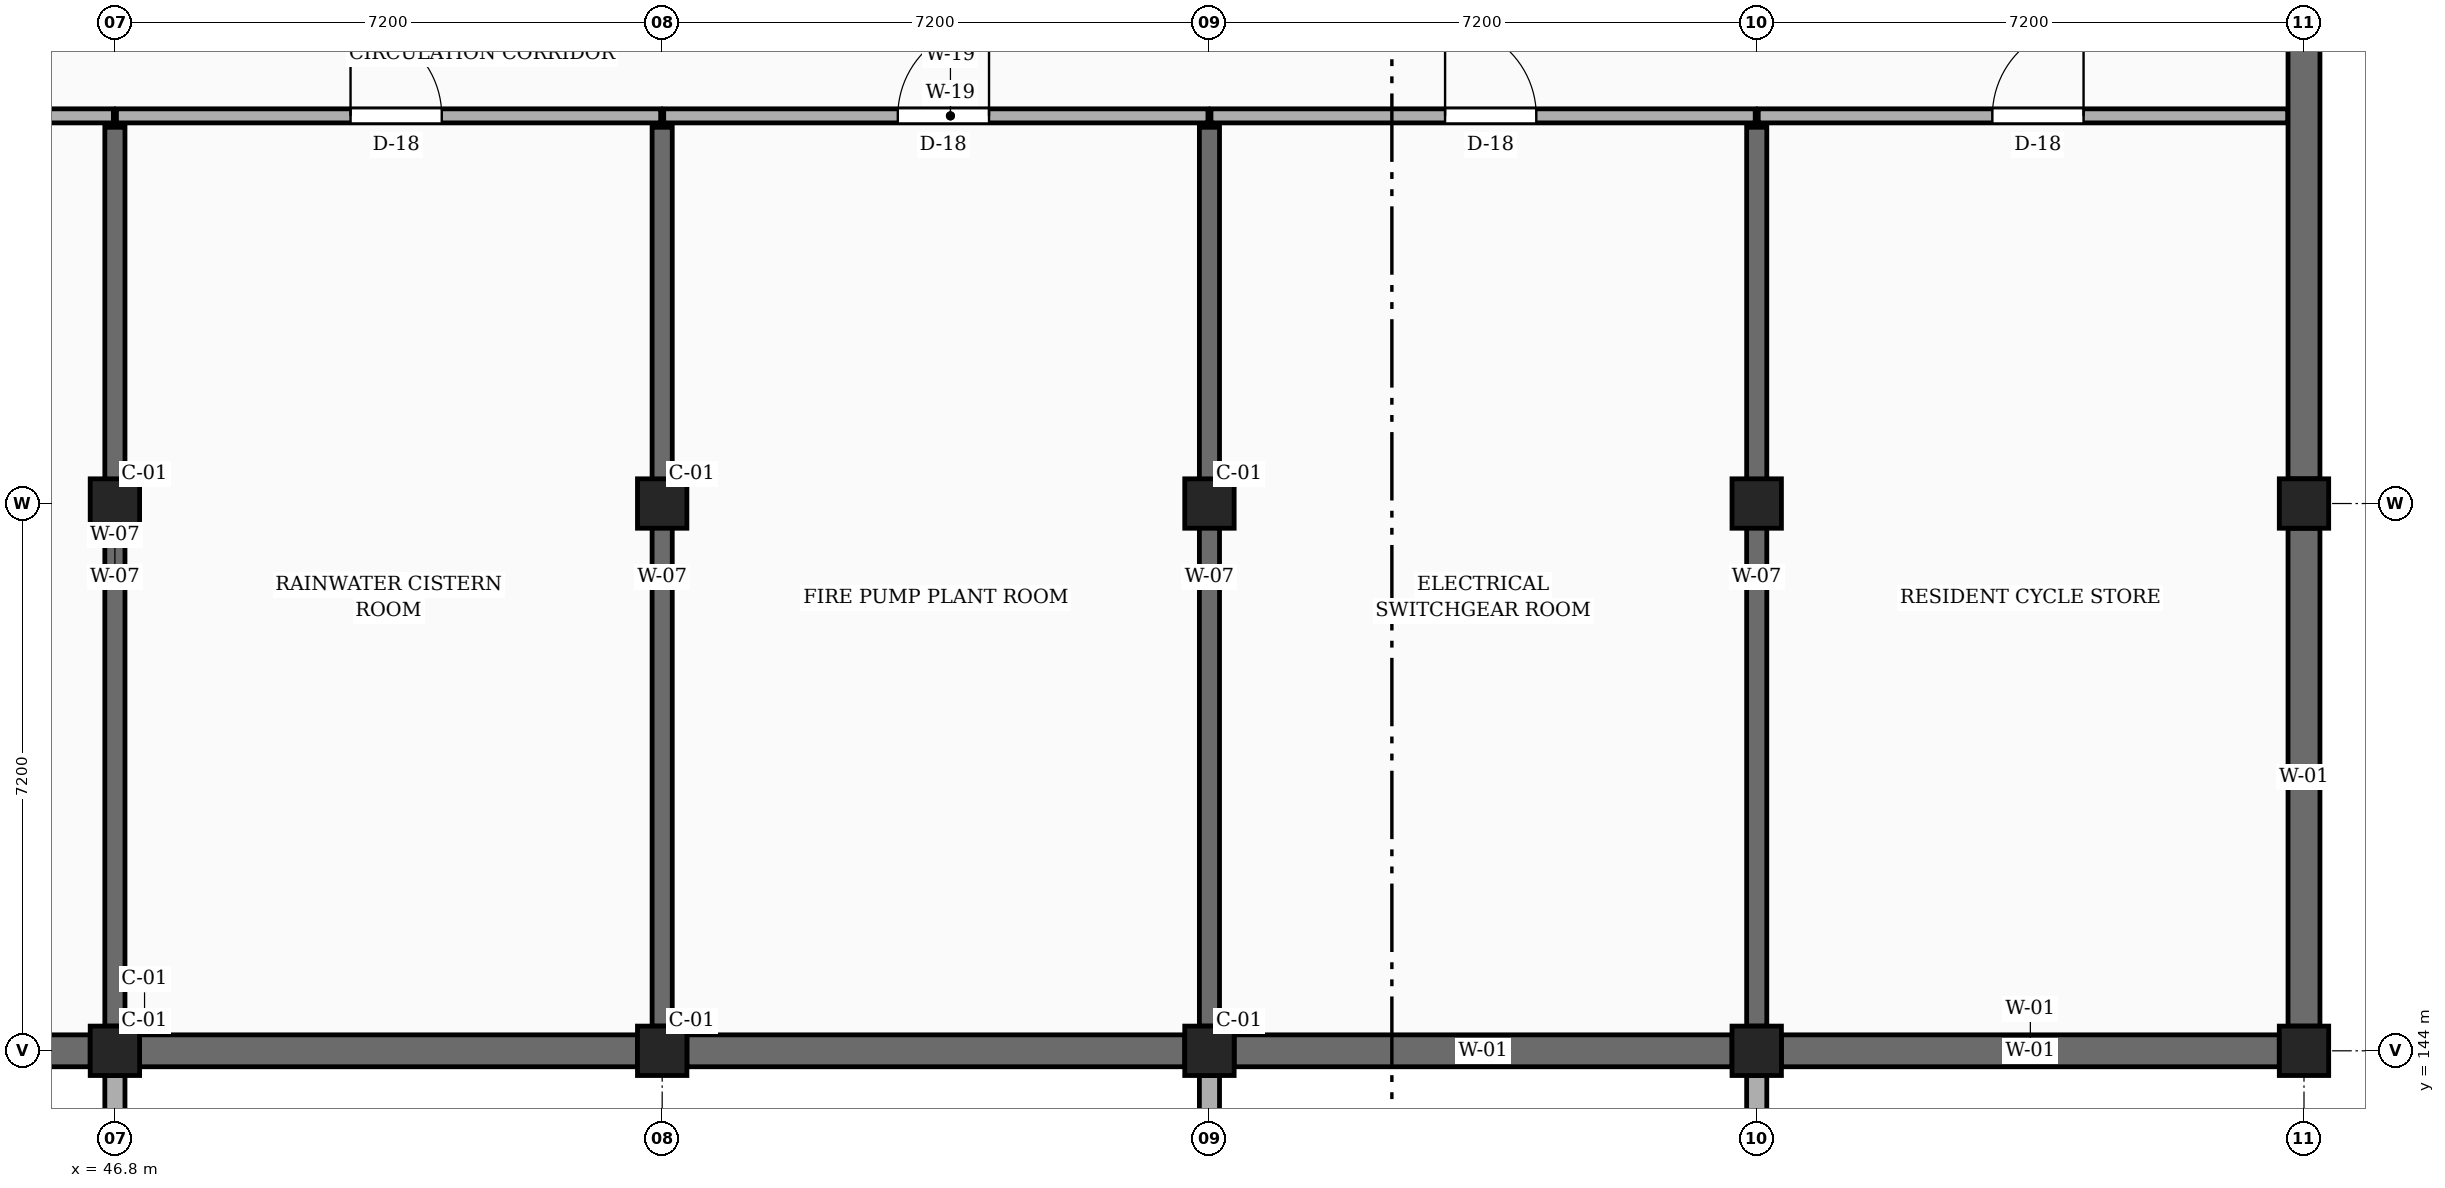
"""IFC4 building model, lengths in metres.
Left out: names, types, materials, properties, quantities, classifications, styles, units other than length and angle.
Written with IfcOpenShell. Run it as: python <this file> out.ifc"""

import sys

from ifc_helpers import new_model, si_unit, direction, frame, frame_2d, origin, origin_2d, place, context, subcontext, project, spatial, rectangle, extrude, element, fill, save


model = new_model("IFC4")
c1 = context("Model", 3, precision=1e-05, world=origin(), true_north=direction((0.0, 1.0)))
c2 = subcontext(c1, "Body", "Model", "MODEL_VIEW")
j1 = project(units=[si_unit("LENGTHUNIT", "METRE"), si_unit("PLANEANGLEUNIT", "RADIAN")], contexts=[c1])
p1 = place(None, origin())
s1 = spatial("IfcSite", under=j1, at=p1, CompositionType="ELEMENT")
p2 = place(p1, origin())
s2 = spatial("IfcBuilding", under=s1, at=p2, CompositionType="ELEMENT")
p3 = place(p2, frame((0.0, 0.0, -4.2)))
s3 = spatial("IfcBuildingStorey", under=s2, at=p3, CompositionType="ELEMENT", Elevation=-4.2)
for number, where, z_axis, x_axis in (
    (1, (46.8, 141.81, 0.0), (0.0, 0.0, 1.0), (0.0, 1.0, 0.0)),
    (2, (68.4, 141.81, 0.0), (0.0, 0.0, 1.0), (0.0, 1.0, 0.0)),
):
    element("IfcWall", number, at=place(p3, frame(where, z_axis=z_axis, x_axis=x_axis)), inside=s3, PredefinedType="SOLIDWALL", context=c2, shape_type="SweptSolid", body=[
        extrude(rectangle(XDim=1.865, YDim=0.265, at=frame_2d((0.933, 0.0))), origin(), (0.0, 0.0, 1.0), 4.12),
    ])
p4 = place(p3, frame((61.2, 143.675, 0.0), z_axis=(0.0, 0.0, 1.0), x_axis=(0.0, -1.0, 0.0)))
e3 = element("IfcWall", 3, at=p4, inside=s3, PredefinedType="SOLIDWALL", context=c2, shape_type="SweptSolid", body=[
    extrude(rectangle(XDim=1.865, YDim=0.265, at=frame_2d((0.933, 0.0))), origin(), (0.0, 0.0, 1.0), 3.35),
])
for number, where, z_axis, x_axis in (
    (4, (46.8, 144.0, 0.0), (0.0, 0.0, 1.0), (1.0, 0.0, 0.0)),
    (5, (46.8, 151.2, 0.0), (0.0, 0.0, 1.0), (1.0, 0.0, 0.0)),
    (6, (54.0, 144.0, 0.0), (0.0, 0.0, 1.0), (1.0, 0.0, 0.0)),
    (7, (54.0, 151.2, 0.0), (0.0, 0.0, 1.0), (1.0, 0.0, 0.0)),
    (8, (61.2, 144.0, 0.0), (0.0, 0.0, 1.0), (1.0, 0.0, 0.0)),
    (9, (61.2, 151.2, 0.0), (0.0, 0.0, 1.0), (1.0, 0.0, 0.0)),
    (10, (68.4, 144.0, 0.0), (0.0, 0.0, 1.0), (1.0, 0.0, 0.0)),
    (11, (68.4, 151.2, 0.0), (0.0, 0.0, 1.0), (1.0, 0.0, 0.0)),
    (12, (75.6, 144.0, 0.0), (0.0, 0.0, 1.0), (1.0, 0.0, 0.0)),
    (13, (75.6, 151.2, 0.0), (0.0, 0.0, 1.0), (1.0, 0.0, 0.0)),
):
    element("IfcColumn", number, at=place(p3, frame(where, z_axis=z_axis, x_axis=x_axis)), inside=s3, PredefinedType="COLUMN", context=c2, shape_type="SweptSolid", body=[
        extrude(rectangle(XDim=0.65, YDim=0.65, at=origin_2d()), origin(), (0.0, 0.0, 1.0), 4.2),
    ])
for number, where, z_axis, x_axis in (
    (14, (39.925, 144.0, 0.0), (0.0, 0.0, 1.0), (1.0, 0.0, 0.0)),
    (15, (47.125, 144.0, 0.0), (0.0, 0.0, 1.0), (1.0, 0.0, 0.0)),
    (16, (54.325, 144.0, 0.0), (0.0, 0.0, 1.0), (1.0, 0.0, 0.0)),
    (17, (61.525, 144.0, 0.0), (0.0, 0.0, 1.0), (1.0, 0.0, 0.0)),
):
    element("IfcWall", number, at=place(p3, frame(where, z_axis=z_axis, x_axis=x_axis)), inside=s3, PredefinedType="USERDEFINED", context=c2, shape_type="SweptSolid", body=[
        extrude(rectangle(XDim=6.55, YDim=0.42, at=frame_2d((3.275, 0.0))), origin(), (0.0, 0.0, 1.0), 3.03),
    ])
p5 = place(p3, frame((68.725, 144.0, 0.0), z_axis=(0.0, 0.0, 1.0), x_axis=(1.0, 0.0, 0.0)))
e18 = element("IfcWall", 18, at=p5, inside=s3, PredefinedType="USERDEFINED", context=c2, shape_type="SweptSolid", body=[
    extrude(rectangle(XDim=6.55, YDim=0.42, at=frame_2d((3.275, 0.0))), origin(), (0.0, 0.0, 1.0), 3.03),
])
for number, where, z_axis, x_axis in (
    (19, (75.6, 144.325, 0.0), (0.0, 0.0, 1.0), (0.0, 1.0, 0.0)),
    (20, (75.6, 151.525, 0.0), (0.0, 0.0, 1.0), (0.0, 1.0, 0.0)),
):
    element("IfcWall", number, at=place(p3, frame(where, z_axis=z_axis, x_axis=x_axis)), inside=s3, PredefinedType="USERDEFINED", context=c2, shape_type="SweptSolid", body=[
        extrude(rectangle(XDim=6.55, YDim=0.42, at=frame_2d((3.275, 0.0))), origin(), (0.0, 0.0, 1.0), 3.03),
    ])
for number, where, z_axis, x_axis in (
    (21, (46.8, 144.325, 0.0), (0.0, 0.0, 1.0), (0.0, 1.0, 0.0)),
    (22, (54.0, 144.325, 0.0), (0.0, 0.0, 1.0), (0.0, 1.0, 0.0)),
    (23, (61.2, 144.325, 0.0), (0.0, 0.0, 1.0), (0.0, 1.0, 0.0)),
    (24, (68.4, 144.325, 0.0), (0.0, 0.0, 1.0), (0.0, 1.0, 0.0)),
):
    element("IfcWall", number, at=place(p3, frame(where, z_axis=z_axis, x_axis=x_axis)), inside=s3, PredefinedType="SOLIDWALL", context=c2, shape_type="SweptSolid", body=[
        extrude(rectangle(XDim=11.825, YDim=0.265, at=frame_2d((5.913, 0.0))), origin(), (0.0, 0.0, 1.0), 3.18),
    ])
p6 = place(p3, frame((39.62, 156.3, 0.0), z_axis=(0.0, 0.0, 1.0), x_axis=(1.0, 0.0, 0.0)))
e25 = element("IfcWall", 25, at=p6, inside=s3, PredefinedType="PARTITIONING", context=c2, shape_type="SweptSolid", body=[
    extrude(rectangle(XDim=7.16, YDim=0.185, at=frame_2d((3.58, 0.0))), origin(), (0.0, 0.0, 1.0), 3.315),
])
p7 = place(p6, frame((3.08, 0.0, 0.0)))
e26 = element("IfcOpeningElement", 26, at=p7, cuts=e25, PredefinedType="OPENING", context=c2, shape_type="SweptSolid", body=[
    extrude(rectangle(XDim=1.2, YDim=2.2, at=frame_2d((0.6, 1.1))), frame((0.0, 0.103, 0.0), z_axis=(0.0, -1.0, 0.0), x_axis=(1.0, 0.0, 0.0)), (0.0, 0.0, 1.0), 0.205),
])
p8 = place(p3, frame((46.82, 156.3, 0.0), z_axis=(0.0, 0.0, 1.0), x_axis=(1.0, 0.0, 0.0)))
e27 = element("IfcWall", 27, at=p8, inside=s3, PredefinedType="PARTITIONING", context=c2, shape_type="SweptSolid", body=[
    extrude(rectangle(XDim=7.16, YDim=0.185, at=frame_2d((3.58, 0.0))), origin(), (0.0, 0.0, 1.0), 3.315),
])
p9 = place(p8, frame((3.08, 0.0, 0.0)))
e28 = element("IfcOpeningElement", 28, at=p9, cuts=e27, PredefinedType="OPENING", context=c2, shape_type="SweptSolid", body=[
    extrude(rectangle(XDim=1.2, YDim=2.2, at=frame_2d((0.6, 1.1))), frame((0.0, 0.103, 0.0), z_axis=(0.0, -1.0, 0.0), x_axis=(1.0, 0.0, 0.0)), (0.0, 0.0, 1.0), 0.205),
])
p10 = place(p3, frame((54.02, 156.3, 0.0), z_axis=(0.0, 0.0, 1.0), x_axis=(1.0, 0.0, 0.0)))
e29 = element("IfcWall", 29, at=p10, inside=s3, PredefinedType="PARTITIONING", context=c2, shape_type="SweptSolid", body=[
    extrude(rectangle(XDim=7.16, YDim=0.185, at=frame_2d((3.58, 0.0))), origin(), (0.0, 0.0, 1.0), 3.315),
])
p11 = place(p10, frame((3.08, 0.0, 0.0)))
e30 = element("IfcOpeningElement", 30, at=p11, cuts=e29, PredefinedType="OPENING", context=c2, shape_type="SweptSolid", body=[
    extrude(rectangle(XDim=1.2, YDim=2.2, at=frame_2d((0.6, 1.1))), frame((0.0, 0.103, 0.0), z_axis=(0.0, -1.0, 0.0), x_axis=(1.0, 0.0, 0.0)), (0.0, 0.0, 1.0), 0.205),
])
p12 = place(p3, frame((61.22, 156.3, 0.0), z_axis=(0.0, 0.0, 1.0), x_axis=(1.0, 0.0, 0.0)))
e31 = element("IfcWall", 31, at=p12, inside=s3, PredefinedType="PARTITIONING", context=c2, shape_type="SweptSolid", body=[
    extrude(rectangle(XDim=7.16, YDim=0.185, at=frame_2d((3.58, 0.0))), origin(), (0.0, 0.0, 1.0), 3.315),
])
p13 = place(p12, frame((3.08, 0.0, 0.0)))
e32 = element("IfcOpeningElement", 32, at=p13, cuts=e31, PredefinedType="OPENING", context=c2, shape_type="SweptSolid", body=[
    extrude(rectangle(XDim=1.2, YDim=2.2, at=frame_2d((0.6, 1.1))), frame((0.0, 0.103, 0.0), z_axis=(0.0, -1.0, 0.0), x_axis=(1.0, 0.0, 0.0)), (0.0, 0.0, 1.0), 0.205),
])
p14 = place(p3, frame((68.42, 156.3, 0.0), z_axis=(0.0, 0.0, 1.0), x_axis=(1.0, 0.0, 0.0)))
e33 = element("IfcWall", 33, at=p14, inside=s3, PredefinedType="PARTITIONING", context=c2, shape_type="SweptSolid", body=[
    extrude(rectangle(XDim=6.965, YDim=0.185, at=frame_2d((3.482, 0.0))), origin(), (0.0, 0.0, 1.0), 3.315),
])
p15 = place(p14, frame((3.08, 0.0, 0.0)))
e34 = element("IfcOpeningElement", 34, at=p15, cuts=e33, PredefinedType="OPENING", context=c2, shape_type="SweptSolid", body=[
    extrude(rectangle(XDim=1.2, YDim=2.2, at=frame_2d((0.6, 1.1))), frame((0.0, 0.103, 0.0), z_axis=(0.0, -1.0, 0.0), x_axis=(1.0, 0.0, 0.0)), (0.0, 0.0, 1.0), 0.205),
])
p16 = place(p9, origin())
e35 = element("IfcDoor", 35, at=p16, inside=s3, OperationType="SINGLE_SWING_LEFT", PredefinedType="DOOR", context=c2, shape_type="SweptSolid", body=[
    extrude(rectangle(XDim=1.2, YDim=2.2, at=frame_2d((0.6, 1.1))), frame((0.0, 0.025, 0.0), z_axis=(0.0, -1.0, 0.0), x_axis=(1.0, 0.0, 0.0)), (0.0, 0.0, 1.0), 0.05),
])
fill(e28, e35)
p17 = place(p11, origin())
e36 = element("IfcDoor", 36, at=p17, inside=s3, OperationType="SINGLE_SWING_RIGHT", PredefinedType="DOOR", context=c2, shape_type="SweptSolid", body=[
    extrude(rectangle(XDim=1.2, YDim=2.2, at=frame_2d((0.6, 1.1))), frame((0.0, 0.025, 0.0), z_axis=(0.0, -1.0, 0.0), x_axis=(1.0, 0.0, 0.0)), (0.0, 0.0, 1.0), 0.05),
])
fill(e30, e36)
p18 = place(p13, origin())
e37 = element("IfcDoor", 37, at=p18, inside=s3, OperationType="SINGLE_SWING_LEFT", PredefinedType="DOOR", context=c2, shape_type="SweptSolid", body=[
    extrude(rectangle(XDim=1.2, YDim=2.2, at=frame_2d((0.6, 1.1))), frame((0.0, 0.025, 0.0), z_axis=(0.0, -1.0, 0.0), x_axis=(1.0, 0.0, 0.0)), (0.0, 0.0, 1.0), 0.05),
])
fill(e32, e37)
p19 = place(p15, origin())
e38 = element("IfcDoor", 38, at=p19, inside=s3, OperationType="SINGLE_SWING_RIGHT", PredefinedType="DOOR", context=c2, shape_type="SweptSolid", body=[
    extrude(rectangle(XDim=1.2, YDim=2.2, at=frame_2d((0.6, 1.1))), frame((0.0, 0.025, 0.0), z_axis=(0.0, -1.0, 0.0), x_axis=(1.0, 0.0, 0.0)), (0.0, 0.0, 1.0), 0.05),
])
fill(e34, e38)
save(model, sys.argv[1])
